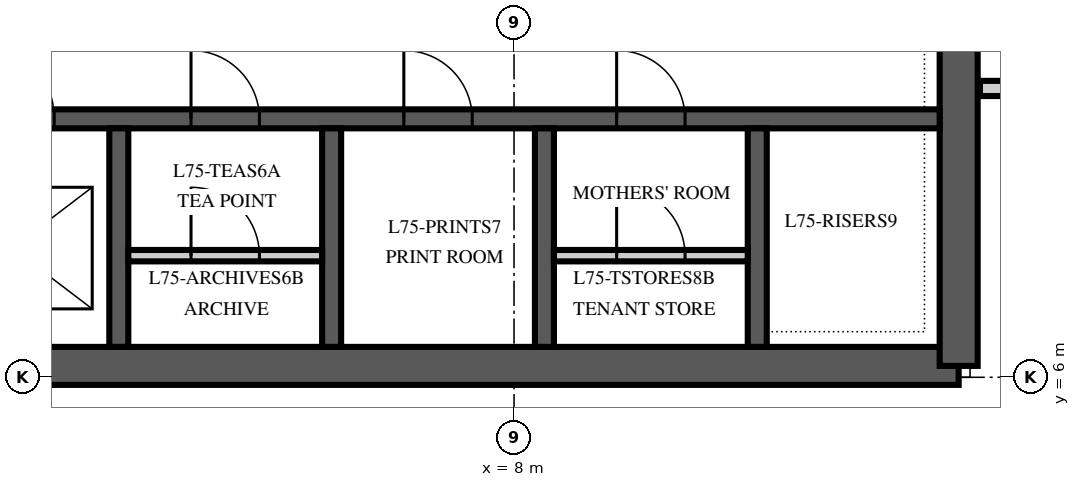
"""IFC4 building model, lengths in metres.
Left out: names, types, materials, properties, quantities, classifications, styles, units other than length and angle.
Written with IfcOpenShell. Run it as: python <this file> out.ifc"""

import sys

from ifc_helpers import new_model, si_unit, direction, frame, frame_2d, origin, place, context, subcontext, project, spatial, polyline, rectangle, outline, extrude, element, fill, save


model = new_model("IFC4")
c1 = context("Model", 3, precision=1e-05, world=origin(), true_north=direction((0.0, 1.0)))
c2 = subcontext(c1, "Body", "Model", "MODEL_VIEW")
j1 = project(units=[si_unit("LENGTHUNIT", "METRE"), si_unit("PLANEANGLEUNIT", "RADIAN")], contexts=[c1])
p1 = place(None, origin())
s1 = spatial("IfcSite", under=j1, at=p1, CompositionType="ELEMENT")
p2 = place(p1, origin())
s2 = spatial("IfcBuilding", under=s1, at=p2, CompositionType="ELEMENT")
p3 = place(p2, frame((0.0, 0.0, 320.0)))
s3 = spatial("IfcBuildingStorey", under=s2, at=p3, CompositionType="ELEMENT", Elevation=320.0)
p4 = place(p3, frame((-13.85, 6.15, 0.0), z_axis=(0.0, 0.0, 1.0), x_axis=(1.0, 0.0, 0.0)))
e1 = element("IfcWall", 1, at=p4, inside=s3, PredefinedType="SHEAR", context=c2, shape_type="SweptSolid", body=[
    extrude(rectangle(XDim=27.7, YDim=0.5, at=frame_2d((13.85, 0.0))), origin(), (0.0, 0.0, 1.0), 4.0),
])
p5 = place(p3, frame((13.85, 6.15, 0.0), z_axis=(0.0, 0.0, 1.0), x_axis=(0.0, 1.0, 0.0)))
e2 = element("IfcWall", 2, at=p5, inside=s3, PredefinedType="SHEAR", context=c2, shape_type="SweptSolid", body=[
    extrude(outline(polyline([(0.0, -0.25), (17.7, -0.25), (17.7, 0.0), (17.45, 0.0), (17.45, 0.25), (0.25, 0.25), (0.25, 0.0), (0.0, 0.0), (0.0, -0.25)])), origin(), (0.0, 0.0, 1.0), 4.0),
])
p6 = place(p5, frame((4.15, 0.0, 0.0)))
e3 = element("IfcOpeningElement", 3, at=p6, cuts=e2, PredefinedType="OPENING", context=c2, shape_type="SweptSolid", body=[
    extrude(rectangle(XDim=1.8, YDim=2.4, at=frame_2d((0.9, 1.2))), frame((0.0, 0.265, 0.0), z_axis=(0.0, -1.0, 0.0), x_axis=(1.0, 0.0, 0.0)), (0.0, 0.0, 1.0), 0.53),
])
p7 = place(p3, frame((-13.6, 9.4, 0.0), z_axis=(0.0, 0.0, 1.0), x_axis=(1.0, 0.0, 0.0)))
e4 = element("IfcWall", 4, at=p7, inside=s3, PredefinedType="SHEAR", context=c2, shape_type="SweptSolid", body=[
    extrude(rectangle(XDim=27.2, YDim=0.25, at=frame_2d((13.6, 0.0))), origin(), (0.0, 0.0, 1.0), 4.0),
])
p8 = place(p7, frame((8.85, 0.0, 0.0)))
e5 = element("IfcOpeningElement", 5, at=p8, cuts=e4, PredefinedType="OPENING", context=c2, shape_type="SweptSolid", body=[
    extrude(rectangle(XDim=1.1, YDim=2.1, at=frame_2d((0.55, 1.05))), frame((0.0, 0.14, 0.0), z_axis=(0.0, -1.0, 0.0), x_axis=(1.0, 0.0, 0.0)), (0.0, 0.0, 1.0), 0.28),
])
p9 = place(p7, frame((11.65, 0.0, 0.0)))
e6 = element("IfcOpeningElement", 6, at=p9, cuts=e4, PredefinedType="OPENING", context=c2, shape_type="SweptSolid", body=[
    extrude(rectangle(XDim=1.1, YDim=2.1, at=frame_2d((0.55, 1.05))), frame((0.0, 0.14, 0.0), z_axis=(0.0, -1.0, 0.0), x_axis=(1.0, 0.0, 0.0)), (0.0, 0.0, 1.0), 0.28),
])
p10 = place(p7, frame((14.45, 0.0, 0.0)))
e7 = element("IfcOpeningElement", 7, at=p10, cuts=e4, PredefinedType="OPENING", context=c2, shape_type="SweptSolid", body=[
    extrude(rectangle(XDim=1.1, YDim=2.1, at=frame_2d((0.55, 1.05))), frame((0.0, 0.14, 0.0), z_axis=(0.0, -1.0, 0.0), x_axis=(1.0, 0.0, 0.0)), (0.0, 0.0, 1.0), 0.28),
])
p11 = place(p7, frame((0.55, 0.0, 0.0)))
e8 = element("IfcOpeningElement", 8, at=p11, cuts=e4, PredefinedType="OPENING", context=c2, shape_type="SweptSolid", body=[
    extrude(rectangle(XDim=0.9, YDim=2.1, at=frame_2d((0.45, 1.05))), frame((0.0, 0.14, 0.0), z_axis=(0.0, -1.0, 0.0), x_axis=(1.0, 0.0, 0.0)), (0.0, 0.0, 1.0), 0.28),
])
p12 = place(p7, frame((3.35, 0.0, 0.0)))
e9 = element("IfcOpeningElement", 9, at=p12, cuts=e4, PredefinedType="OPENING", context=c2, shape_type="SweptSolid", body=[
    extrude(rectangle(XDim=0.9, YDim=2.1, at=frame_2d((0.45, 1.05))), frame((0.0, 0.14, 0.0), z_axis=(0.0, -1.0, 0.0), x_axis=(1.0, 0.0, 0.0)), (0.0, 0.0, 1.0), 0.28),
])
p13 = place(p7, frame((6.15, 0.0, 0.0)))
e10 = element("IfcOpeningElement", 10, at=p13, cuts=e4, PredefinedType="OPENING", context=c2, shape_type="SweptSolid", body=[
    extrude(rectangle(XDim=0.9, YDim=2.1, at=frame_2d((0.45, 1.05))), frame((0.0, 0.14, 0.0), z_axis=(0.0, -1.0, 0.0), x_axis=(1.0, 0.0, 0.0)), (0.0, 0.0, 1.0), 0.28),
])
p14 = place(p7, frame((17.35, 0.0, 0.0)))
e11 = element("IfcOpeningElement", 11, at=p14, cuts=e4, PredefinedType="OPENING", context=c2, shape_type="SweptSolid", body=[
    extrude(rectangle(XDim=0.9, YDim=2.1, at=frame_2d((0.45, 1.05))), frame((0.0, 0.14, 0.0), z_axis=(0.0, -1.0, 0.0), x_axis=(1.0, 0.0, 0.0)), (0.0, 0.0, 1.0), 0.28),
])
p15 = place(p7, frame((20.15, 0.0, 0.0)))
e12 = element("IfcOpeningElement", 12, at=p15, cuts=e4, PredefinedType="OPENING", context=c2, shape_type="SweptSolid", body=[
    extrude(rectangle(XDim=0.9, YDim=2.1, at=frame_2d((0.45, 1.05))), frame((0.0, 0.14, 0.0), z_axis=(0.0, -1.0, 0.0), x_axis=(1.0, 0.0, 0.0)), (0.0, 0.0, 1.0), 0.28),
])
p16 = place(p7, frame((22.95, 0.0, 0.0)))
e13 = element("IfcOpeningElement", 13, at=p16, cuts=e4, PredefinedType="OPENING", context=c2, shape_type="SweptSolid", body=[
    extrude(rectangle(XDim=0.9, YDim=2.1, at=frame_2d((0.45, 1.05))), frame((0.0, 0.14, 0.0), z_axis=(0.0, -1.0, 0.0), x_axis=(1.0, 0.0, 0.0)), (0.0, 0.0, 1.0), 0.28),
])
for number, where, z_axis, x_axis in (
    (14, (2.8, 6.4, 0.0), (0.0, 0.0, 1.0), (0.0, 1.0, 0.0)),
    (15, (5.6, 6.4, 0.0), (0.0, 0.0, 1.0), (0.0, 1.0, 0.0)),
    (16, (8.4, 6.4, 0.0), (0.0, 0.0, 1.0), (0.0, 1.0, 0.0)),
    (17, (11.2, 6.4, 0.0), (0.0, 0.0, 1.0), (0.0, 1.0, 0.0)),
):
    element("IfcWall", number, at=place(p3, frame(where, z_axis=z_axis, x_axis=x_axis)), inside=s3, PredefinedType="SHEAR", context=c2, shape_type="SweptSolid", body=[
        extrude(rectangle(XDim=2.875, YDim=0.25, at=frame_2d((1.438, 0.0))), origin(), (0.0, 0.0, 1.0), 4.0),
    ])
p17 = place(p3, frame((2.925, 7.6, 0.0), z_axis=(0.0, 0.0, 1.0), x_axis=(1.0, 0.0, 0.0)))
e18 = element("IfcWall", 18, at=p17, inside=s3, PredefinedType="PARTITIONING", context=c2, shape_type="SweptSolid", body=[
    extrude(rectangle(XDim=2.55, YDim=0.15, at=frame_2d((1.275, 0.0))), origin(), (0.0, 0.0, 1.0), 3.85),
])
p18 = place(p17, frame((0.825, 0.0, 0.0)))
e19 = element("IfcOpeningElement", 19, at=p18, cuts=e18, PredefinedType="OPENING", context=c2, shape_type="SweptSolid", body=[
    extrude(rectangle(XDim=0.9, YDim=2.1, at=frame_2d((0.45, 1.05))), frame((0.0, 0.09, 0.0), z_axis=(0.0, -1.0, 0.0), x_axis=(1.0, 0.0, 0.0)), (0.0, 0.0, 1.0), 0.18),
])
p19 = place(p3, frame((8.525, 7.6, 0.0), z_axis=(0.0, 0.0, 1.0), x_axis=(1.0, 0.0, 0.0)))
e20 = element("IfcWall", 20, at=p19, inside=s3, PredefinedType="PARTITIONING", context=c2, shape_type="SweptSolid", body=[
    extrude(rectangle(XDim=2.55, YDim=0.15, at=frame_2d((1.275, 0.0))), origin(), (0.0, 0.0, 1.0), 3.85),
])
p20 = place(p19, frame((0.825, 0.0, 0.0)))
e21 = element("IfcOpeningElement", 21, at=p20, cuts=e20, PredefinedType="OPENING", context=c2, shape_type="SweptSolid", body=[
    extrude(rectangle(XDim=0.9, YDim=2.1, at=frame_2d((0.45, 1.05))), frame((0.0, 0.09, 0.0), z_axis=(0.0, -1.0, 0.0), x_axis=(1.0, 0.0, 0.0)), (0.0, 0.0, 1.0), 0.18),
])
p21 = place(p3, frame((14.13, 9.8, 0.0), z_axis=(0.0, 0.0, 1.0), x_axis=(1.0, 0.0, 0.0)))
e22 = element("IfcWall", 22, at=p21, inside=s3, PredefinedType="PARTITIONING", context=c2, shape_type="SweptSolid", body=[
    extrude(rectangle(XDim=2.02, YDim=0.2, at=frame_2d((1.01, 0.0))), origin(), (0.0, 0.0, 1.0), 3.75),
])
p22 = place(p10, origin())
e23 = element("IfcDoor", 23, at=p22, inside=s3, OperationType="SLIDING_TO_LEFT", PredefinedType="DOOR", context=c2, shape_type="SweptSolid", body=[
    extrude(rectangle(XDim=1.1, YDim=2.1, at=frame_2d((0.55, 1.05))), frame((0.0, 0.125, 0.0), z_axis=(0.0, -1.0, 0.0), x_axis=(1.0, 0.0, 0.0)), (0.0, 0.0, 1.0), 0.25),
])
fill(e7, e23)
p23 = place(p14, origin())
e24 = element("IfcDoor", 24, at=p23, inside=s3, OperationType="SINGLE_SWING_LEFT", PredefinedType="DOOR", context=c2, shape_type="SweptSolid", body=[
    extrude(rectangle(XDim=0.9, YDim=2.1, at=frame_2d((0.45, 1.05))), frame((0.0, 0.125, 0.0), z_axis=(0.0, -1.0, 0.0), x_axis=(1.0, 0.0, 0.0)), (0.0, 0.0, 1.0), 0.25),
])
fill(e11, e24)
p24 = place(p18, origin())
e25 = element("IfcDoor", 25, at=p24, inside=s3, OperationType="SINGLE_SWING_LEFT", PredefinedType="DOOR", context=c2, shape_type="SweptSolid", body=[
    extrude(rectangle(XDim=0.9, YDim=2.1, at=frame_2d((0.45, 1.05))), frame((0.0, 0.075, 0.0), z_axis=(0.0, -1.0, 0.0), x_axis=(1.0, 0.0, 0.0)), (0.0, 0.0, 1.0), 0.149),
])
fill(e19, e25)
p25 = place(p15, origin())
e26 = element("IfcDoor", 26, at=p25, inside=s3, OperationType="SINGLE_SWING_LEFT", PredefinedType="DOOR", context=c2, shape_type="SweptSolid", body=[
    extrude(rectangle(XDim=0.9, YDim=2.1, at=frame_2d((0.45, 1.05))), frame((0.0, 0.125, 0.0), z_axis=(0.0, -1.0, 0.0), x_axis=(1.0, 0.0, 0.0)), (0.0, 0.0, 1.0), 0.25),
])
fill(e12, e26)
p26 = place(p16, origin())
e27 = element("IfcDoor", 27, at=p26, inside=s3, OperationType="SINGLE_SWING_LEFT", PredefinedType="DOOR", context=c2, shape_type="SweptSolid", body=[
    extrude(rectangle(XDim=0.9, YDim=2.1, at=frame_2d((0.45, 1.05))), frame((0.0, 0.125, 0.0), z_axis=(0.0, -1.0, 0.0), x_axis=(1.0, 0.0, 0.0)), (0.0, 0.0, 1.0), 0.25),
])
fill(e13, e27)
p27 = place(p20, origin())
e28 = element("IfcDoor", 28, at=p27, inside=s3, OperationType="SINGLE_SWING_LEFT", PredefinedType="DOOR", context=c2, shape_type="SweptSolid", body=[
    extrude(rectangle(XDim=0.9, YDim=2.1, at=frame_2d((0.45, 1.05))), frame((0.0, 0.075, 0.0), z_axis=(0.0, -1.0, 0.0), x_axis=(1.0, 0.0, 0.0)), (0.0, 0.0, 1.0), 0.149),
])
fill(e21, e28)
save(model, sys.argv[1])
